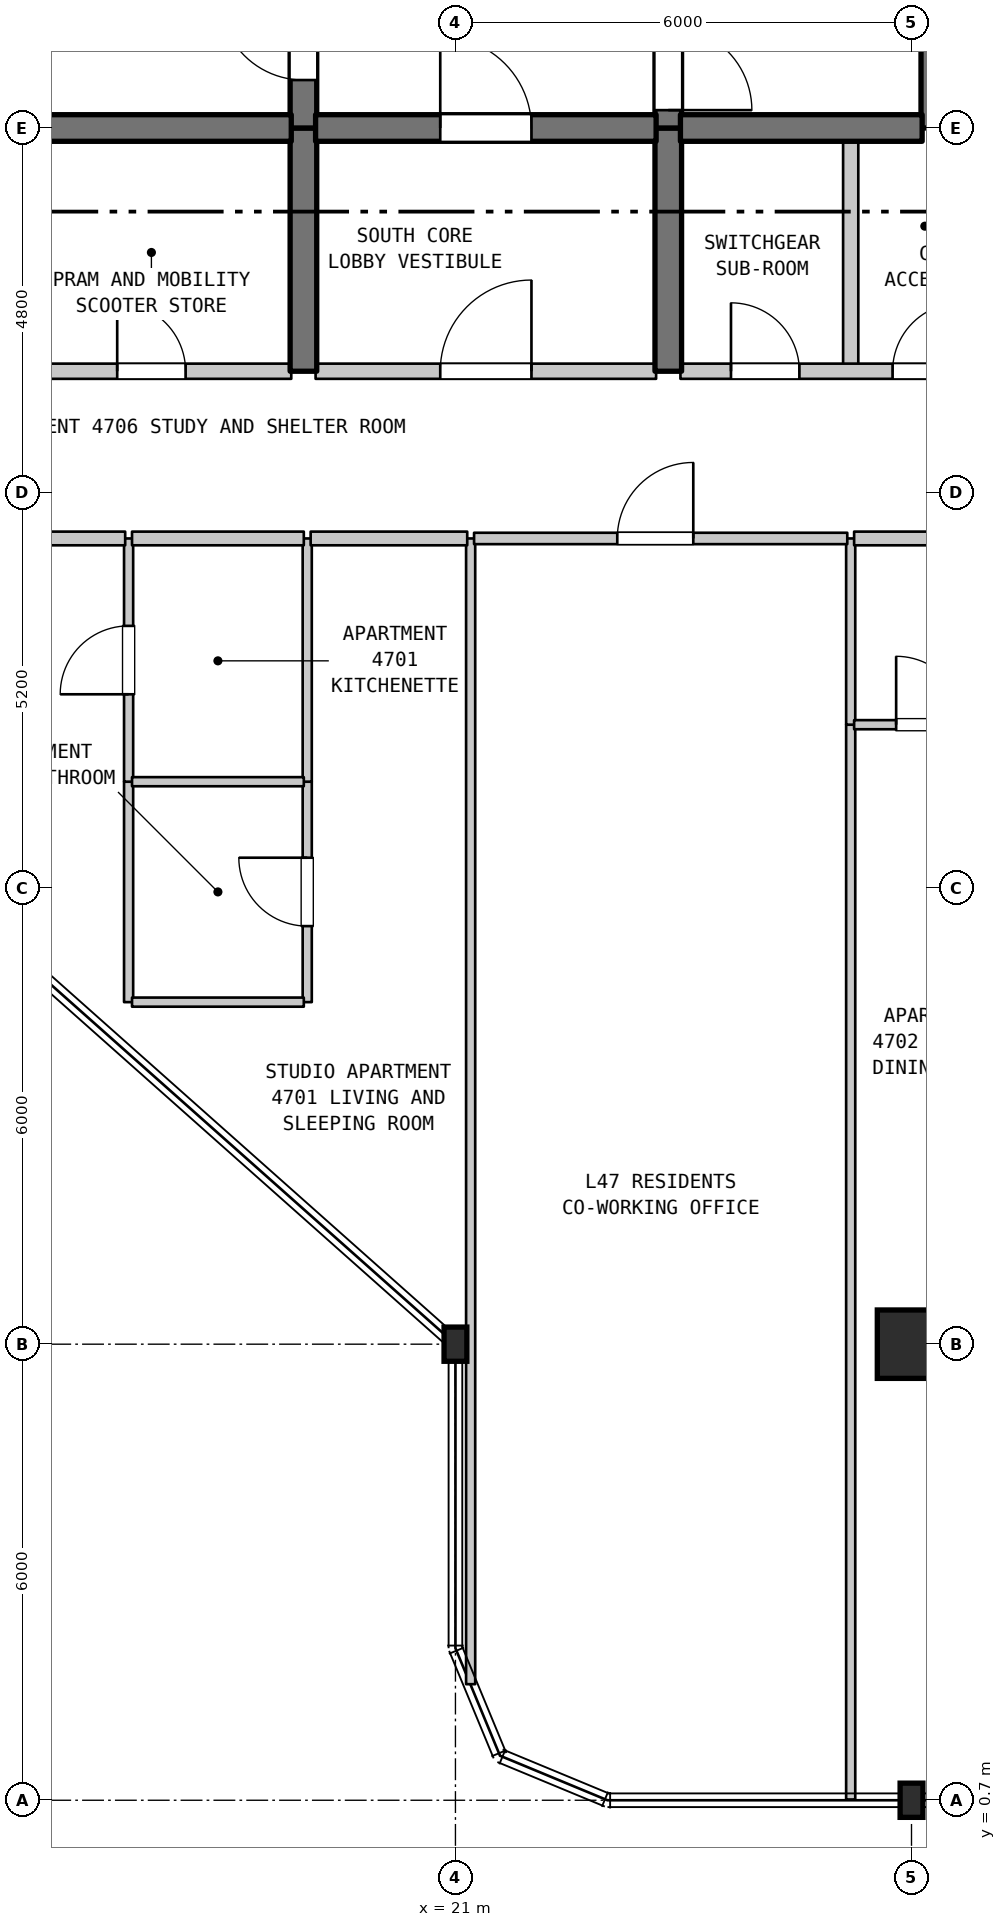
"""IFC4 building model, lengths in metres.
Left out: names, types, materials, properties, quantities, classifications, styles, units other than length and angle.
Written with IfcOpenShell. Run it as: python <this file> out.ifc"""

import sys

from ifc_helpers import new_model, si_unit, direction, frame, frame_2d, origin, origin_2d, place, context, subcontext, project, spatial, rectangle, i_section, extrude, element, fill, save


model = new_model("IFC4")
c1 = context("Model", 3, precision=1e-05, world=origin(), true_north=direction((0.0, 1.0)))
c2 = subcontext(c1, "Body", "Model", "MODEL_VIEW")
j1 = project(units=[si_unit("LENGTHUNIT", "METRE"), si_unit("PLANEANGLEUNIT", "RADIAN")], contexts=[c1])
p1 = place(None, origin())
s1 = spatial("IfcSite", under=j1, at=p1, CompositionType="ELEMENT")
p2 = place(p1, origin())
s2 = spatial("IfcBuilding", under=s1, at=p2, CompositionType="ELEMENT")
p3 = place(p2, frame((0.0, 0.0, 192.1)))
s3 = spatial("IfcBuildingStorey", under=s2, at=p3, CompositionType="ELEMENT", Elevation=192.1)
for number, where, z_axis, x_axis in (
    (1, (21.0, 6.7, 0.0), (0.0, 0.0, 1.0), (1.0, 0.0, 0.0)),
    (2, (27.0, 0.7, 0.0), (0.0, 0.0, 1.0), (1.0, 0.0, 0.0)),
):
    element("IfcColumn", number, at=place(p3, frame(where, z_axis=z_axis, x_axis=x_axis)), inside=s3, PredefinedType="COLUMN", context=c2, shape_type="SweptSolid", body=[
        extrude(i_section(OverallWidth=0.3, OverallDepth=0.45, WebThickness=0.014, FlangeThickness=0.026, FilletRadius=0.027, at=origin_2d()), origin(), (0.0, 0.0, 1.0), 3.7),
    ])
p4 = place(p3, frame((27.0, 6.7, 0.0), z_axis=(0.0, 0.0, 1.0), x_axis=(1.0, 0.0, 0.0)))
e3 = element("IfcColumn", 3, at=p4, inside=s3, PredefinedType="COLUMN", context=c2, shape_type="SweptSolid", body=[
    extrude(rectangle(XDim=0.9, YDim=0.9, at=origin_2d()), origin(), (0.0, 0.0, 1.0), 3.7),
])
p5 = place(p3, frame((16.7, 11.2, 0.0), z_axis=(0.0, 0.0, 1.0), x_axis=(0.0, 1.0, 0.0)))
e4 = element("IfcWall", 4, at=p5, inside=s3, PredefinedType="PARTITIONING", context=c2, shape_type="SweptSolid", body=[
    extrude(rectangle(XDim=2.9, YDim=0.12, at=frame_2d((1.45, 0.0))), origin(), (0.0, 0.0, 1.0), 3.39),
])
p6 = place(p3, frame((16.7, 14.1, 0.0), z_axis=(0.0, 0.0, 1.0), x_axis=(0.0, 1.0, 0.0)))
e5 = element("IfcWall", 5, at=p6, inside=s3, PredefinedType="PARTITIONING", context=c2, shape_type="SweptSolid", body=[
    extrude(rectangle(XDim=3.2, YDim=0.12, at=frame_2d((1.6, 0.0))), origin(), (0.0, 0.0, 1.0), 3.39),
])
p7 = place(p6, frame((1.15, 0.0, 0.0)))
e6 = element("IfcOpeningElement", 6, at=p7, cuts=e5, PredefinedType="OPENING", context=c2, shape_type="SweptSolid", body=[
    extrude(rectangle(XDim=0.9, YDim=2.15, at=frame_2d((0.45, 1.075))), frame((0.0, 0.07, 0.0), z_axis=(0.0, -1.0, 0.0), x_axis=(1.0, 0.0, 0.0)), (0.0, 0.0, 1.0), 0.14),
])
p8 = place(p3, frame((19.0, 19.5, 0.0), z_axis=(0.0, 0.0, 1.0), x_axis=(0.0, 1.0, 0.0)))
e7 = element("IfcWall", 7, at=p8, inside=s3, PredefinedType="SHEAR", context=c2, shape_type="SweptSolid", body=[
    extrude(rectangle(XDim=3.2, YDim=0.35, at=frame_2d((1.6, 0.0))), origin(), (0.0, 0.0, 1.0), 3.39),
])
p9 = place(p3, frame((19.0, 22.7, 0.0), z_axis=(0.0, 0.0, 1.0), x_axis=(0.0, 1.0, 0.0)))
e8 = element("IfcWall", 8, at=p9, inside=s3, PredefinedType="SHEAR", context=c2, shape_type="SweptSolid", body=[
    extrude(rectangle(XDim=5.5, YDim=0.35, at=frame_2d((2.75, 0.0))), origin(), (0.0, 0.0, 1.0), 3.39),
])
p10 = place(p9, frame((0.631, 0.0, 0.0)))
e9 = element("IfcOpeningElement", 9, at=p10, cuts=e8, PredefinedType="OPENING", context=c2, shape_type="SweptSolid", body=[
    extrude(rectangle(XDim=1.1, YDim=2.15, at=frame_2d((0.55, 1.075))), frame((0.0, 0.185, 0.0), z_axis=(0.0, -1.0, 0.0), x_axis=(1.0, 0.0, 0.0)), (0.0, 0.0, 1.0), 0.37),
])
p11 = place(p3, frame((19.05, 11.2, 0.0), z_axis=(0.0, 0.0, 1.0), x_axis=(0.0, 1.0, 0.0)))
e10 = element("IfcWall", 10, at=p11, inside=s3, PredefinedType="PARTITIONING", context=c2, shape_type="SweptSolid", body=[
    extrude(rectangle(XDim=2.9, YDim=0.12, at=frame_2d((1.45, 0.0))), origin(), (0.0, 0.0, 1.0), 3.39),
])
p12 = place(p11, frame((1.0, 0.0, 0.0)))
e11 = element("IfcOpeningElement", 11, at=p12, cuts=e10, PredefinedType="OPENING", context=c2, shape_type="SweptSolid", body=[
    extrude(rectangle(XDim=0.9, YDim=2.1, at=frame_2d((0.45, 1.05))), frame((0.0, 0.07, 0.0), z_axis=(0.0, -1.0, 0.0), x_axis=(1.0, 0.0, 0.0)), (0.0, 0.0, 1.0), 0.14),
])
p13 = place(p3, frame((19.05, 14.1, 0.0), z_axis=(0.0, 0.0, 1.0), x_axis=(0.0, 1.0, 0.0)))
e12 = element("IfcWall", 12, at=p13, inside=s3, PredefinedType="PARTITIONING", context=c2, shape_type="SweptSolid", body=[
    extrude(rectangle(XDim=3.2, YDim=0.12, at=frame_2d((1.6, 0.0))), origin(), (0.0, 0.0, 1.0), 3.39),
])
p14 = place(p3, frame((21.2, 2.227, 0.0), z_axis=(0.0, 0.0, 1.0), x_axis=(0.0, 1.0, 0.0)))
e13 = element("IfcWall", 13, at=p14, inside=s3, PredefinedType="PARTITIONING", context=c2, shape_type="SweptSolid", body=[
    extrude(rectangle(XDim=15.073, YDim=0.12, at=frame_2d((7.537, 0.0))), origin(), (0.0, 0.0, 1.0), 3.39),
])
p15 = place(p3, frame((23.8, 19.5, 0.0), z_axis=(0.0, 0.0, 1.0), x_axis=(0.0, 1.0, 0.0)))
e14 = element("IfcWall", 14, at=p15, inside=s3, PredefinedType="SHEAR", context=c2, shape_type="SweptSolid", body=[
    extrude(rectangle(XDim=3.2, YDim=0.35, at=frame_2d((1.6, 0.0))), origin(), (0.0, 0.0, 1.0), 3.39),
])
p16 = place(p3, frame((23.8, 22.7, 0.0), z_axis=(0.0, 0.0, 1.0), x_axis=(0.0, 1.0, 0.0)))
e15 = element("IfcWall", 15, at=p16, inside=s3, PredefinedType="SHEAR", context=c2, shape_type="SweptSolid", body=[
    extrude(rectangle(XDim=5.5, YDim=0.35, at=frame_2d((2.75, 0.0))), origin(), (0.0, 0.0, 1.0), 3.39),
])
p17 = place(p16, frame((0.235, 0.0, 0.0)))
e16 = element("IfcOpeningElement", 16, at=p17, cuts=e15, PredefinedType="OPENING", context=c2, shape_type="SweptSolid", body=[
    extrude(rectangle(XDim=1.1, YDim=2.15, at=frame_2d((0.55, 1.075))), frame((0.0, 0.185, 0.0), z_axis=(0.0, -1.0, 0.0), x_axis=(1.0, 0.0, 0.0)), (0.0, 0.0, 1.0), 0.37),
])
p18 = place(p3, frame((26.2, 0.71, 0.0), z_axis=(0.0, 0.0, 1.0), x_axis=(0.0, 1.0, 0.0)))
e17 = element("IfcWall", 17, at=p18, inside=s3, PredefinedType="PARTITIONING", context=c2, shape_type="SweptSolid", body=[
    extrude(rectangle(XDim=14.14, YDim=0.12, at=frame_2d((7.07, 0.0))), origin(), (0.0, 0.0, 1.0), 3.39),
])
p19 = place(p3, frame((26.2, 14.85, 0.0), z_axis=(0.0, 0.0, 1.0), x_axis=(0.0, 1.0, 0.0)))
e18 = element("IfcWall", 18, at=p19, inside=s3, PredefinedType="PARTITIONING", context=c2, shape_type="SweptSolid", body=[
    extrude(rectangle(XDim=2.45, YDim=0.12, at=frame_2d((1.225, 0.0))), origin(), (0.0, 0.0, 1.0), 3.39),
])
p20 = place(p3, frame((26.2, 19.5, 0.0), z_axis=(0.0, 0.0, 1.0), x_axis=(0.0, 1.0, 0.0)))
e19 = element("IfcWall", 19, at=p20, inside=s3, PredefinedType="STANDARD", context=c2, shape_type="SweptSolid", body=[
    extrude(rectangle(XDim=3.2, YDim=0.2, at=frame_2d((1.6, 0.0))), origin(), (0.0, 0.0, 1.0), 3.39),
])
p21 = place(p3, frame((27.3, 22.7, 0.0), z_axis=(0.0, 0.0, 1.0), x_axis=(0.0, 1.0, 0.0)))
e20 = element("IfcWall", 20, at=p21, inside=s3, PredefinedType="SHEAR", context=c2, shape_type="SweptSolid", body=[
    extrude(rectangle(XDim=2.9, YDim=0.35, at=frame_2d((1.45, 0.0))), origin(), (0.0, 0.0, 1.0), 3.39),
])
for number, where, z_axis, x_axis in (
    (21, (16.745, 11.2, 0.0), (0.0, 0.0, 1.0), (1.0, 0.0, 0.0)),
    (22, (16.745, 14.1, 0.0), (0.0, 0.0, 1.0), (1.0, 0.0, 0.0)),
):
    element("IfcWall", number, at=place(p3, frame(where, z_axis=z_axis, x_axis=x_axis)), inside=s3, PredefinedType="PARTITIONING", context=c2, shape_type="SweptSolid", body=[
        extrude(rectangle(XDim=2.26, YDim=0.12, at=frame_2d((1.13, 0.0))), origin(), (0.0, 0.0, 1.0), 3.39),
    ])
p22 = place(p3, frame((26.245, 14.85, 0.0), z_axis=(0.0, 0.0, 1.0), x_axis=(1.0, 0.0, 0.0)))
e23 = element("IfcWall", 23, at=p22, inside=s3, PredefinedType="PARTITIONING", context=c2, shape_type="SweptSolid", body=[
    extrude(rectangle(XDim=2.16, YDim=0.12, at=frame_2d((1.08, 0.0))), origin(), (0.0, 0.0, 1.0), 3.39),
])
p23 = place(p22, frame((0.553, 0.0, 0.0)))
e24 = element("IfcOpeningElement", 24, at=p23, cuts=e23, PredefinedType="OPENING", context=c2, shape_type="SweptSolid", body=[
    extrude(rectangle(XDim=0.9, YDim=2.15, at=frame_2d((0.45, 1.075))), frame((0.0, 0.07, 0.0), z_axis=(0.0, -1.0, 0.0), x_axis=(1.0, 0.0, 0.0)), (0.0, 0.0, 1.0), 0.14),
])
p24 = place(p3, frame((12.875, 17.3, 0.0), z_axis=(0.0, 0.0, 1.0), x_axis=(1.0, 0.0, 0.0)))
e25 = element("IfcWall", 25, at=p24, inside=s3, PredefinedType="STANDARD", context=c2, shape_type="SweptSolid", body=[
    extrude(rectangle(XDim=3.78, YDim=0.18, at=frame_2d((1.89, 0.0))), origin(), (0.0, 0.0, 1.0), 3.39),
])
p25 = place(p24, frame((0.458, 0.0, 0.0)))
e26 = element("IfcOpeningElement", 26, at=p25, cuts=e25, PredefinedType="OPENING", context=c2, shape_type="SweptSolid", body=[
    extrude(rectangle(XDim=1.0, YDim=2.15, at=frame_2d((0.5, 1.075))), frame((0.0, 0.1, 0.0), z_axis=(0.0, -1.0, 0.0), x_axis=(1.0, 0.0, 0.0)), (0.0, 0.0, 1.0), 0.2),
])
p26 = place(p3, frame((16.745, 17.3, 0.0), z_axis=(0.0, 0.0, 1.0), x_axis=(1.0, 0.0, 0.0)))
e27 = element("IfcWall", 27, at=p26, inside=s3, PredefinedType="STANDARD", context=c2, shape_type="SweptSolid", body=[
    extrude(rectangle(XDim=2.26, YDim=0.18, at=frame_2d((1.13, 0.0))), origin(), (0.0, 0.0, 1.0), 3.39),
])
p27 = place(p3, frame((19.095, 17.3, 0.0), z_axis=(0.0, 0.0, 1.0), x_axis=(1.0, 0.0, 0.0)))
e28 = element("IfcWall", 28, at=p27, inside=s3, PredefinedType="STANDARD", context=c2, shape_type="SweptSolid", body=[
    extrude(rectangle(XDim=2.06, YDim=0.18, at=frame_2d((1.03, 0.0))), origin(), (0.0, 0.0, 1.0), 3.39),
])
p28 = place(p3, frame((21.245, 17.3, 0.0), z_axis=(0.0, 0.0, 1.0), x_axis=(1.0, 0.0, 0.0)))
e29 = element("IfcWall", 29, at=p28, inside=s3, PredefinedType="STANDARD", context=c2, shape_type="SweptSolid", body=[
    extrude(rectangle(XDim=4.91, YDim=0.15, at=frame_2d((2.455, 0.0))), origin(), (0.0, 0.0, 1.0), 3.39),
])
p29 = place(p28, frame((1.884, 0.0, 0.0)))
e30 = element("IfcOpeningElement", 30, at=p29, cuts=e29, PredefinedType="OPENING", context=c2, shape_type="SweptSolid", body=[
    extrude(rectangle(XDim=1.0, YDim=2.15, at=frame_2d((0.5, 1.075))), frame((0.0, 0.085, 0.0), z_axis=(0.0, -1.0, 0.0), x_axis=(1.0, 0.0, 0.0)), (0.0, 0.0, 1.0), 0.17),
])
p30 = place(p3, frame((26.245, 17.3, 0.0), z_axis=(0.0, 0.0, 1.0), x_axis=(1.0, 0.0, 0.0)))
e31 = element("IfcWall", 31, at=p30, inside=s3, PredefinedType="STANDARD", context=c2, shape_type="SweptSolid", body=[
    extrude(rectangle(XDim=5.095, YDim=0.18, at=frame_2d((2.547, 0.0))), origin(), (0.0, 0.0, 1.0), 3.39),
])
p31 = place(p30, frame((2.08, 0.0, 0.0)))
e32 = element("IfcOpeningElement", 32, at=p31, cuts=e31, PredefinedType="OPENING", context=c2, shape_type="SweptSolid", body=[
    extrude(rectangle(XDim=1.0, YDim=2.15, at=frame_2d((0.5, 1.075))), frame((0.0, 0.1, 0.0), z_axis=(0.0, -1.0, 0.0), x_axis=(1.0, 0.0, 0.0)), (0.0, 0.0, 1.0), 0.2),
])
p32 = place(p3, frame((15.16, 19.5, 0.0), z_axis=(0.0, 0.0, 1.0), x_axis=(1.0, 0.0, 0.0)))
e33 = element("IfcWall", 33, at=p32, inside=s3, PredefinedType="STANDARD", context=c2, shape_type="SweptSolid", body=[
    extrude(rectangle(XDim=3.68, YDim=0.2, at=frame_2d((1.84, 0.0))), origin(), (0.0, 0.0, 1.0), 3.39),
])
p33 = place(p32, frame((1.39, 0.0, 0.0)))
e34 = element("IfcOpeningElement", 34, at=p33, cuts=e33, PredefinedType="OPENING", context=c2, shape_type="SweptSolid", body=[
    extrude(rectangle(XDim=0.9, YDim=2.15, at=frame_2d((0.45, 1.075))), frame((0.0, 0.11, 0.0), z_axis=(0.0, -1.0, 0.0), x_axis=(1.0, 0.0, 0.0)), (0.0, 0.0, 1.0), 0.22),
])
p34 = place(p3, frame((19.16, 19.5, 0.0), z_axis=(0.0, 0.0, 1.0), x_axis=(1.0, 0.0, 0.0)))
e35 = element("IfcWall", 35, at=p34, inside=s3, PredefinedType="STANDARD", context=c2, shape_type="SweptSolid", body=[
    extrude(rectangle(XDim=4.48, YDim=0.2, at=frame_2d((2.24, 0.0))), origin(), (0.0, 0.0, 1.0), 3.39),
])
p35 = place(p34, frame((1.64, 0.0, 0.0)))
e36 = element("IfcOpeningElement", 36, at=p35, cuts=e35, PredefinedType="OPENING", context=c2, shape_type="SweptSolid", body=[
    extrude(rectangle(XDim=1.2, YDim=2.2, at=frame_2d((0.6, 1.1))), frame((0.0, 0.11, 0.0), z_axis=(0.0, -1.0, 0.0), x_axis=(1.0, 0.0, 0.0)), (0.0, 0.0, 1.0), 0.22),
])
p36 = place(p3, frame((23.96, 19.5, 0.0), z_axis=(0.0, 0.0, 1.0), x_axis=(1.0, 0.0, 0.0)))
e37 = element("IfcWall", 37, at=p36, inside=s3, PredefinedType="STANDARD", context=c2, shape_type="SweptSolid", body=[
    extrude(rectangle(XDim=4.455, YDim=0.2, at=frame_2d((2.228, 0.0))), origin(), (0.0, 0.0, 1.0), 3.39),
])
p37 = place(p36, frame((0.665, 0.0, 0.0)))
e38 = element("IfcOpeningElement", 38, at=p37, cuts=e37, PredefinedType="OPENING", context=c2, shape_type="SweptSolid", body=[
    extrude(rectangle(XDim=0.9, YDim=2.15, at=frame_2d((0.45, 1.075))), frame((0.0, 0.11, 0.0), z_axis=(0.0, -1.0, 0.0), x_axis=(1.0, 0.0, 0.0)), (0.0, 0.0, 1.0), 0.22),
])
p38 = place(p36, frame((2.791, 0.0, 0.0)))
e39 = element("IfcOpeningElement", 39, at=p38, cuts=e37, PredefinedType="OPENING", context=c2, shape_type="SweptSolid", body=[
    extrude(rectangle(XDim=0.9, YDim=2.15, at=frame_2d((0.45, 1.075))), frame((0.0, 0.11, 0.0), z_axis=(0.0, -1.0, 0.0), x_axis=(1.0, 0.0, 0.0)), (0.0, 0.0, 1.0), 0.22),
])
p39 = place(p3, frame((15.16, 22.7, 0.0), z_axis=(0.0, 0.0, 1.0), x_axis=(1.0, 0.0, 0.0)))
e40 = element("IfcWall", 40, at=p39, inside=s3, PredefinedType="SHEAR", context=c2, shape_type="SweptSolid", body=[
    extrude(rectangle(XDim=3.68, YDim=0.35, at=frame_2d((1.84, 0.0))), origin(), (0.0, 0.0, 1.0), 3.39),
])
p40 = place(p3, frame((19.16, 22.7, 0.0), z_axis=(0.0, 0.0, 1.0), x_axis=(1.0, 0.0, 0.0)))
e41 = element("IfcWall", 41, at=p40, inside=s3, PredefinedType="SHEAR", context=c2, shape_type="SweptSolid", body=[
    extrude(rectangle(XDim=4.48, YDim=0.35, at=frame_2d((2.24, 0.0))), origin(), (0.0, 0.0, 1.0), 3.39),
])
p41 = place(p40, frame((1.64, 0.0, 0.0)))
e42 = element("IfcOpeningElement", 42, at=p41, cuts=e41, PredefinedType="OPENING", context=c2, shape_type="SweptSolid", body=[
    extrude(rectangle(XDim=1.2, YDim=2.2, at=frame_2d((0.6, 1.1))), frame((0.0, 0.185, 0.0), z_axis=(0.0, -1.0, 0.0), x_axis=(1.0, 0.0, 0.0)), (0.0, 0.0, 1.0), 0.37),
])
p42 = place(p3, frame((23.96, 22.7, 0.0), z_axis=(0.0, 0.0, 1.0), x_axis=(1.0, 0.0, 0.0)))
e43 = element("IfcWall", 43, at=p42, inside=s3, PredefinedType="SHEAR", context=c2, shape_type="SweptSolid", body=[
    extrude(rectangle(XDim=3.18, YDim=0.35, at=frame_2d((1.59, 0.0))), origin(), (0.0, 0.0, 1.0), 3.39),
])
p43 = place(p7, origin())
e44 = element("IfcDoor", 44, at=p43, inside=s3, OperationType="SINGLE_SWING_LEFT", PredefinedType="DOOR", context=c2, shape_type="SweptSolid", body=[
    extrude(rectangle(XDim=0.9, YDim=2.15, at=frame_2d((0.45, 1.075))), frame((0.0, 0.025, 0.0), z_axis=(0.0, -1.0, 0.0), x_axis=(1.0, 0.0, 0.0)), (0.0, 0.0, 1.0), 0.05),
])
fill(e6, e44)
p44 = place(p10, origin())
e45 = element("IfcDoor", 45, at=p44, inside=s3, OperationType="SINGLE_SWING_RIGHT", PredefinedType="DOOR", context=c2, shape_type="SweptSolid", body=[
    extrude(rectangle(XDim=1.1, YDim=2.15, at=frame_2d((0.55, 1.075))), frame((0.0, 0.025, 0.0), z_axis=(0.0, -1.0, 0.0), x_axis=(1.0, 0.0, 0.0)), (0.0, 0.0, 1.0), 0.05),
])
fill(e9, e45)
p45 = place(p12, origin())
e46 = element("IfcDoor", 46, at=p45, inside=s3, OperationType="SINGLE_SWING_RIGHT", PredefinedType="DOOR", context=c2, shape_type="SweptSolid", body=[
    extrude(rectangle(XDim=0.9, YDim=2.1, at=frame_2d((0.45, 1.05))), frame((0.0, 0.025, 0.0), z_axis=(0.0, -1.0, 0.0), x_axis=(1.0, 0.0, 0.0)), (0.0, 0.0, 1.0), 0.05),
])
fill(e11, e46)
p46 = place(p17, frame((1.1, 0.0, 0.0), z_axis=(0.0, 0.0, 1.0), x_axis=(-1.0, 0.0, 0.0)))
e47 = element("IfcDoor", 47, at=p46, inside=s3, OperationType="SINGLE_SWING_LEFT", PredefinedType="DOOR", context=c2, shape_type="SweptSolid", body=[
    extrude(rectangle(XDim=1.1, YDim=2.15, at=frame_2d((0.55, 1.075))), frame((0.0, 0.025, 0.0), z_axis=(0.0, -1.0, 0.0), x_axis=(1.0, 0.0, 0.0)), (0.0, 0.0, 1.0), 0.05),
])
fill(e16, e47)
p47 = place(p23, origin())
e48 = element("IfcDoor", 48, at=p47, inside=s3, OperationType="SINGLE_SWING_LEFT", PredefinedType="DOOR", context=c2, shape_type="SweptSolid", body=[
    extrude(rectangle(XDim=0.9, YDim=2.15, at=frame_2d((0.45, 1.075))), frame((0.0, 0.025, 0.0), z_axis=(0.0, -1.0, 0.0), x_axis=(1.0, 0.0, 0.0)), (0.0, 0.0, 1.0), 0.05),
])
fill(e24, e48)
p48 = place(p29, origin())
e49 = element("IfcDoor", 49, at=p48, inside=s3, OperationType="SINGLE_SWING_RIGHT", PredefinedType="DOOR", context=c2, shape_type="SweptSolid", body=[
    extrude(rectangle(XDim=1.0, YDim=2.15, at=frame_2d((0.5, 1.075))), frame((0.0, 0.025, 0.0), z_axis=(0.0, -1.0, 0.0), x_axis=(1.0, 0.0, 0.0)), (0.0, 0.0, 1.0), 0.05),
])
fill(e30, e49)
p49 = place(p33, origin())
e50 = element("IfcDoor", 50, at=p49, inside=s3, OperationType="SINGLE_SWING_LEFT", PredefinedType="DOOR", context=c2, shape_type="SweptSolid", body=[
    extrude(rectangle(XDim=0.9, YDim=2.15, at=frame_2d((0.45, 1.075))), frame((0.0, 0.025, 0.0), z_axis=(0.0, -1.0, 0.0), x_axis=(1.0, 0.0, 0.0)), (0.0, 0.0, 1.0), 0.05),
])
fill(e34, e50)
p50 = place(p35, origin())
e51 = element("IfcDoor", 51, at=p50, inside=s3, OperationType="SINGLE_SWING_RIGHT", PredefinedType="DOOR", context=c2, shape_type="SweptSolid", body=[
    extrude(rectangle(XDim=1.2, YDim=2.2, at=frame_2d((0.6, 1.1))), frame((0.0, 0.025, 0.0), z_axis=(0.0, -1.0, 0.0), x_axis=(1.0, 0.0, 0.0)), (0.0, 0.0, 1.0), 0.05),
])
fill(e36, e51)
p51 = place(p37, origin())
e52 = element("IfcDoor", 52, at=p51, inside=s3, OperationType="SINGLE_SWING_LEFT", PredefinedType="DOOR", context=c2, shape_type="SweptSolid", body=[
    extrude(rectangle(XDim=0.9, YDim=2.15, at=frame_2d((0.45, 1.075))), frame((0.0, 0.025, 0.0), z_axis=(0.0, -1.0, 0.0), x_axis=(1.0, 0.0, 0.0)), (0.0, 0.0, 1.0), 0.05),
])
fill(e38, e52)
p52 = place(p38, origin())
e53 = element("IfcDoor", 53, at=p52, inside=s3, OperationType="SINGLE_SWING_RIGHT", PredefinedType="DOOR", context=c2, shape_type="SweptSolid", body=[
    extrude(rectangle(XDim=0.9, YDim=2.15, at=frame_2d((0.45, 1.075))), frame((0.0, 0.025, 0.0), z_axis=(0.0, -1.0, 0.0), x_axis=(1.0, 0.0, 0.0)), (0.0, 0.0, 1.0), 0.05),
])
fill(e39, e53)
p53 = place(p41, origin())
e54 = element("IfcDoor", 54, at=p53, inside=s3, OperationType="SINGLE_SWING_LEFT", PredefinedType="DOOR", context=c2, shape_type="SweptSolid", body=[
    extrude(rectangle(XDim=1.2, YDim=2.2, at=frame_2d((0.6, 1.1))), frame((0.0, 0.025, 0.0), z_axis=(0.0, -1.0, 0.0), x_axis=(1.0, 0.0, 0.0)), (0.0, 0.0, 1.0), 0.05),
])
fill(e42, e54)
save(model, sys.argv[1])
